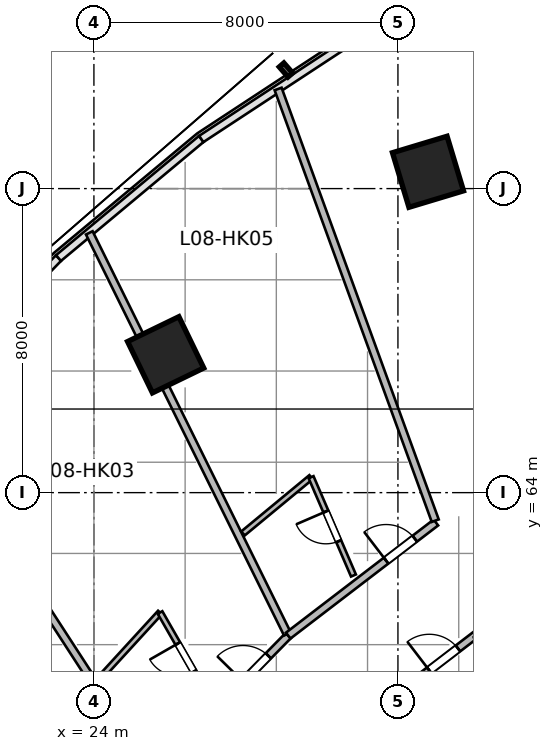
"""IFC4 building model, lengths in metres.
Left out: names, types, materials, properties, quantities, classifications, styles, units other than length and angle.
Written with IfcOpenShell. Run it as: python <this file> out.ifc"""

import sys

from ifc_helpers import new_model, si_unit, direction, frame, frame_2d, origin, origin_2d, place, context, subcontext, project, spatial, rectangle, extrude, source, transform, mapped, element, fill, save


model = new_model("IFC4")
c1 = context("Model", 3, precision=1e-05, world=origin(), true_north=direction((0.0, 1.0)))
c2 = subcontext(c1, "Body", "Model", "MODEL_VIEW")
j1 = project(units=[si_unit("LENGTHUNIT", "METRE"), si_unit("PLANEANGLEUNIT", "RADIAN")], contexts=[c1])
p1 = place(None, origin())
s1 = spatial("IfcSite", under=j1, at=p1, CompositionType="ELEMENT")
p2 = place(p1, origin())
s2 = spatial("IfcBuilding", under=s1, at=p2, CompositionType="ELEMENT")
p3 = place(p2, frame((0.0, 0.0, 42.6)))
s3 = spatial("IfcBuildingStorey", under=s2, at=p3, CompositionType="ELEMENT", Elevation=42.6)
m1 = source(origin(), c2, "Body", "SweptSolid", [
    extrude(rectangle(XDim=1.5, YDim=1.5, at=origin_2d()), origin(), (0.0, 0.0, 1.0), 3.6),
])
for number, where, z_axis, x_axis in (
    (1, (25.888, 67.627, 0.0), (0.0, 0.0, 1.0), (-0.436, 0.9, 0.0)),
    (2, (32.791, 72.442, 0.0), (0.0, 0.0, 1.0), (-0.289, 0.957, 0.0)),
):
    element("IfcColumn", number, at=place(p3, frame(where, z_axis=z_axis, x_axis=x_axis)), inside=s3, PredefinedType="COLUMN", context=c2, shape_type="MappedRepresentation", body=[
        mapped(m1, transform((0.0, 0.0, 0.0), scale=1.0)),
    ])
m2 = source(origin(), c2, "Body", "SweptSolid", [
    extrude(rectangle(XDim=11.403, YDim=0.195, at=frame_2d((5.701, 0.0))), origin(), (0.0, 0.0, 1.0), 3.36),
])
p4 = place(p3, frame((25.523, 56.647, 0.0), z_axis=(0.0, 0.0, 1.0), x_axis=(-0.544246090008, 0.838925618581, 0.0)))
e3 = element("IfcWall", 3, at=p4, inside=s3, PredefinedType="PARTITIONING", context=c2, shape_type="MappedRepresentation", body=[
    mapped(m2, transform((0.0, 0.0, 0.0), scale=1.0)),
])
m3 = source(origin(), c2, "Body", "SweptSolid", [
    extrude(rectangle(XDim=5.087, YDim=0.195, at=frame_2d((2.543, 0.0))), origin(), (0.0, 0.0, 1.0), 3.36),
])
p5 = place(p3, frame((25.55, 56.607, 0.0), z_axis=(0.0, 0.0, 1.0), x_axis=(0.700428330775, 0.7137227427, 0.0)))
e4 = element("IfcWall", 4, at=p5, inside=s3, PredefinedType="PARTITIONING", context=c2, shape_type="MappedRepresentation", body=[
    mapped(m3, transform((0.0, 0.0, 0.0), scale=1.0)),
])
p6 = place(p5, frame((3.391, 0.0, 0.0)))
e5 = element("IfcOpeningElement", 5, at=p6, cuts=e4, PredefinedType="OPENING", context=c2, shape_type="SweptSolid", body=[
    extrude(rectangle(XDim=0.95, YDim=2.15, at=frame_2d((0.475, 1.075))), frame((0.0, 0.107, 0.0), z_axis=(0.0, -1.0, 0.0), x_axis=(1.0, 0.0, 0.0)), (0.0, 0.0, 1.0), 0.215),
])
m4 = source(origin(), c2, "Body", "SweptSolid", [
    extrude(rectangle(XDim=11.77, YDim=0.195, at=frame_2d((5.885, 0.0))), origin(), (0.0, 0.0, 1.0), 3.36),
])
p7 = place(p3, frame((29.091, 60.282, 0.0), z_axis=(0.0, 0.0, 1.0), x_axis=(-0.44286060326, 0.896590478468, 0.0)))
e6 = element("IfcWall", 6, at=p7, inside=s3, PredefinedType="PARTITIONING", context=c2, shape_type="MappedRepresentation", body=[
    mapped(m4, transform((0.0, 0.0, 0.0), scale=1.0)),
])
m5 = source(origin(), c2, "Body", "SweptSolid", [
    extrude(rectangle(XDim=2.416, YDim=0.14, at=frame_2d((1.208, 0.0))), origin(), (0.0, 0.0, 1.0), 3.36),
])
p8 = place(p3, frame((24.108, 59.064, 0.0), z_axis=(0.0, 0.0, 1.0), x_axis=(0.675399637907, 0.737451916476, 0.0)))
e7 = element("IfcWall", 7, at=p8, inside=s3, PredefinedType="PARTITIONING", context=c2, shape_type="MappedRepresentation", body=[
    mapped(m5, transform((0.0, 0.0, 0.0), scale=1.0)),
])
m6 = source(origin(), c2, "Body", "SweptSolid", [
    extrude(rectangle(XDim=2.732, YDim=0.14, at=frame_2d((1.366, 0.0))), origin(), (0.0, 0.0, 1.0), 3.36),
])
p9 = place(p3, frame((27.098, 58.476, 0.0), z_axis=(0.0, 0.0, 1.0), x_axis=(-0.497254966372, 0.867604459658, 0.0)))
e8 = element("IfcWall", 8, at=p9, inside=s3, PredefinedType="PARTITIONING", context=c2, shape_type="MappedRepresentation", body=[
    mapped(m6, transform((0.0, 0.0, 0.0), scale=1.0)),
])
p10 = place(p9, frame((0.941, 0.0, 0.0)))
e9 = element("IfcOpeningElement", 9, at=p10, cuts=e8, PredefinedType="OPENING", context=c2, shape_type="SweptSolid", body=[
    extrude(rectangle(XDim=0.85, YDim=2.05, at=frame_2d((0.425, 1.025))), frame((0.0, 0.08, 0.0), z_axis=(0.0, -1.0, 0.0), x_axis=(1.0, 0.0, 0.0)), (0.0, 0.0, 1.0), 0.16),
])
m7 = source(origin(), c2, "Body", "SweptSolid", [
    extrude(rectangle(XDim=4.895, YDim=0.195, at=frame_2d((2.447, 0.0))), origin(), (0.0, 0.0, 1.0), 3.36),
])
p11 = place(p3, frame((29.113, 60.238, 0.0), z_axis=(0.0, 0.0, 1.0), x_axis=(0.793896075849, 0.608053468661, 0.0)))
e10 = element("IfcWall", 10, at=p11, inside=s3, PredefinedType="PARTITIONING", context=c2, shape_type="MappedRepresentation", body=[
    mapped(m7, transform((0.0, 0.0, 0.0), scale=1.0)),
])
p12 = place(p11, frame((3.245, 0.0, 0.0)))
e11 = element("IfcOpeningElement", 11, at=p12, cuts=e10, PredefinedType="OPENING", context=c2, shape_type="SweptSolid", body=[
    extrude(rectangle(XDim=0.95, YDim=2.15, at=frame_2d((0.475, 1.075))), frame((0.0, 0.107, 0.0), z_axis=(0.0, -1.0, 0.0), x_axis=(1.0, 0.0, 0.0)), (0.0, 0.0, 1.0), 0.215),
])
m8 = source(origin(), c2, "Body", "SweptSolid", [
    extrude(rectangle(XDim=12.088, YDim=0.195, at=frame_2d((6.044, 0.0))), origin(), (0.0, 0.0, 1.0), 3.36),
])
p13 = place(p3, frame((32.981, 63.262, 0.0), z_axis=(0.0, 0.0, 1.0), x_axis=(-0.34203007529, 0.939689005787, 0.0)))
e12 = element("IfcWall", 12, at=p13, inside=s3, PredefinedType="PARTITIONING", context=c2, shape_type="MappedRepresentation", body=[
    mapped(m8, transform((0.0, 0.0, 0.0), scale=1.0)),
])
m9 = source(origin(), c2, "Body", "SweptSolid", [
    extrude(rectangle(XDim=2.324, YDim=0.14, at=frame_2d((1.162, 0.0))), origin(), (0.0, 0.0, 1.0), 3.36),
])
p14 = place(p3, frame((27.923, 62.926, 0.0), z_axis=(0.0, 0.0, 1.0), x_axis=(0.770746444956, 0.637141991701, 0.0)))
e13 = element("IfcWall", 13, at=p14, inside=s3, PredefinedType="PARTITIONING", context=c2, shape_type="MappedRepresentation", body=[
    mapped(m9, transform((0.0, 0.0, 0.0), scale=1.0)),
])
m10 = source(origin(), c2, "Body", "SweptSolid", [
    extrude(rectangle(XDim=2.818, YDim=0.14, at=frame_2d((1.409, 0.0))), origin(), (0.0, 0.0, 1.0), 3.36),
])
p15 = place(p3, frame((30.83, 61.819, 0.0), z_axis=(0.0, 0.0, 1.0), x_axis=(-0.395894859341, 0.918295845764, 0.0)))
e14 = element("IfcWall", 14, at=p15, inside=s3, PredefinedType="PARTITIONING", context=c2, shape_type="MappedRepresentation", body=[
    mapped(m10, transform((0.0, 0.0, 0.0), scale=1.0)),
])
p16 = place(p15, frame((0.984, 0.0, 0.0)))
e15 = element("IfcOpeningElement", 15, at=p16, cuts=e14, PredefinedType="OPENING", context=c2, shape_type="SweptSolid", body=[
    extrude(rectangle(XDim=0.85, YDim=2.05, at=frame_2d((0.425, 1.025))), frame((0.0, 0.08, 0.0), z_axis=(0.0, -1.0, 0.0), x_axis=(1.0, 0.0, 0.0)), (0.0, 0.0, 1.0), 0.16),
])
m11 = source(origin(), c2, "Body", "SweptSolid", [
    extrude(rectangle(XDim=4.546, YDim=0.195, at=frame_2d((2.273, 0.0))), origin(), (0.0, 0.0, 1.0), 3.36),
])
p17 = place(p3, frame((30.459, 57.511, 0.0), z_axis=(0.0, 0.0, 1.0), x_axis=(0.793907931297, 0.608037989457, 0.0)))
e16 = element("IfcWall", 16, at=p17, inside=s3, PredefinedType="PARTITIONING", context=c2, shape_type="MappedRepresentation", body=[
    mapped(m11, transform((0.0, 0.0, 0.0), scale=1.0)),
])
p18 = place(p17, frame((2.98, 0.0, 0.0)))
e17 = element("IfcOpeningElement", 17, at=p18, cuts=e16, PredefinedType="OPENING", context=c2, shape_type="SweptSolid", body=[
    extrude(rectangle(XDim=0.95, YDim=2.15, at=frame_2d((0.475, 1.075))), frame((0.0, 0.107, 0.0), z_axis=(0.0, -1.0, 0.0), x_axis=(1.0, 0.0, 0.0)), (0.0, 0.0, 1.0), 0.215),
])
m12 = source(origin(), c2, "Body", "SweptSolid", [
    extrude(rectangle(XDim=0.95, YDim=2.15, at=frame_2d((0.475, 1.075))), frame((0.0, 0.025, 0.0), z_axis=(0.0, -1.0, 0.0), x_axis=(1.0, 0.0, 0.0)), (0.0, 0.0, 1.0), 0.05),
])
p19 = place(p6, origin())
e18 = element("IfcDoor", 18, at=p19, inside=s3, OperationType="SINGLE_SWING_LEFT", PredefinedType="DOOR", context=c2, shape_type="MappedRepresentation", body=[
    mapped(m12, transform((0.0, 0.0, 0.0), scale=1.0)),
])
fill(e5, e18)
m13 = source(origin(), c2, "Body", "SweptSolid", [
    extrude(rectangle(XDim=0.85, YDim=2.05, at=frame_2d((0.425, 1.025))), frame((0.0, 0.025, 0.0), z_axis=(0.0, -1.0, 0.0), x_axis=(1.0, 0.0, 0.0)), (0.0, 0.0, 1.0), 0.05),
])
p20 = place(p10, origin())
e19 = element("IfcDoor", 19, at=p20, inside=s3, OperationType="SINGLE_SWING_RIGHT", PredefinedType="DOOR", context=c2, shape_type="MappedRepresentation", body=[
    mapped(m13, transform((0.0, 0.0, 0.0), scale=1.0)),
])
fill(e9, e19)
p21 = place(p12, origin())
e20 = element("IfcDoor", 20, at=p21, inside=s3, OperationType="SINGLE_SWING_LEFT", PredefinedType="DOOR", context=c2, shape_type="MappedRepresentation", body=[
    mapped(m12, transform((0.0, 0.0, 0.0), scale=1.0)),
])
fill(e11, e20)
p22 = place(p16, origin())
e21 = element("IfcDoor", 21, at=p22, inside=s3, OperationType="SINGLE_SWING_RIGHT", PredefinedType="DOOR", context=c2, shape_type="MappedRepresentation", body=[
    mapped(m13, transform((0.0, 0.0, 0.0), scale=1.0)),
])
fill(e15, e21)
p23 = place(p18, origin())
e22 = element("IfcDoor", 22, at=p23, inside=s3, OperationType="SINGLE_SWING_LEFT", PredefinedType="DOOR", context=c2, shape_type="MappedRepresentation", body=[
    mapped(m12, transform((0.0, 0.0, 0.0), scale=1.0)),
])
fill(e17, e22)
save(model, sys.argv[1])
